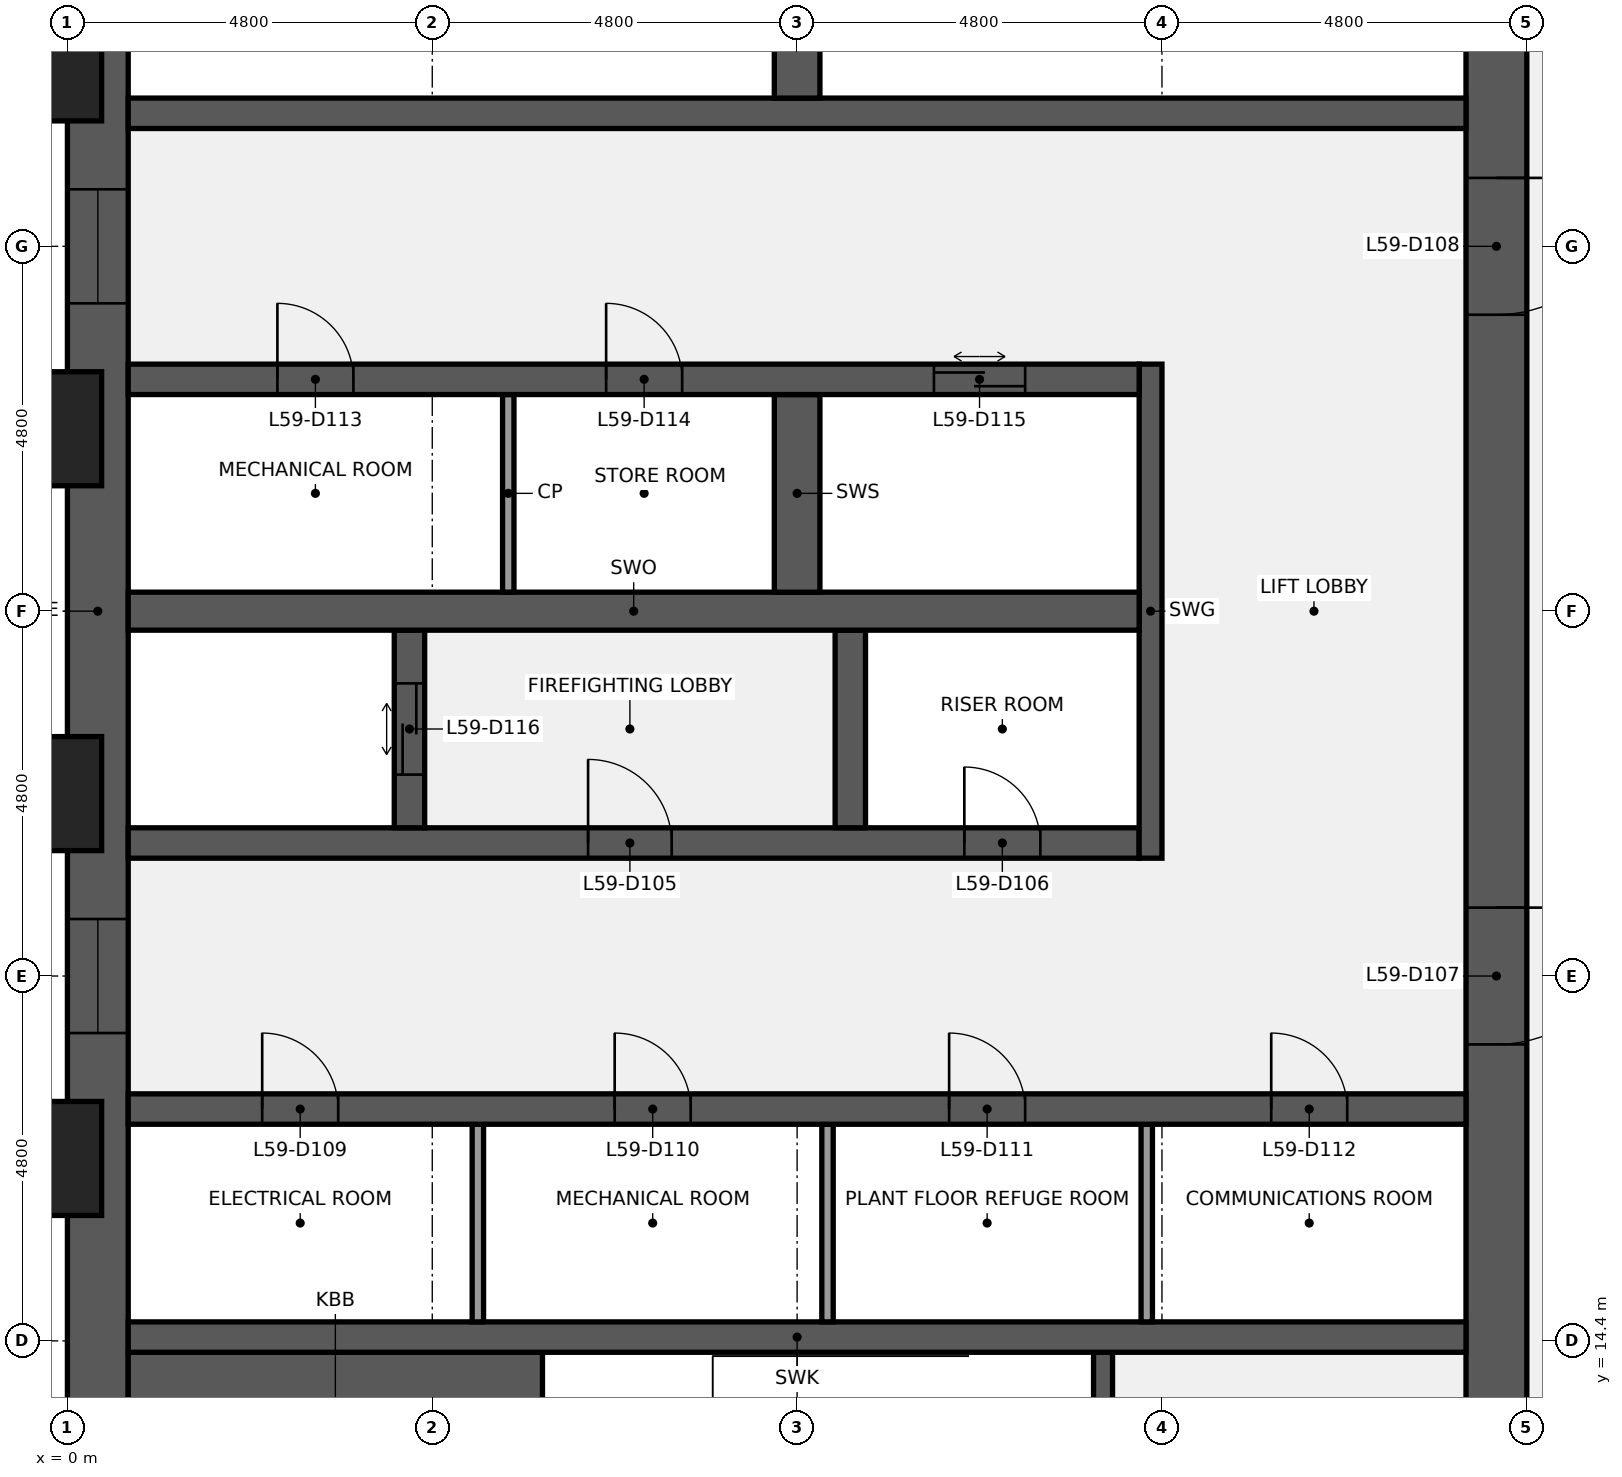
"""IFC4 building model, lengths in metres.
Left out: names, types, materials, properties, quantities, classifications, styles, units other than length and angle.
Written with IfcOpenShell. Run it as: python <this file> out.ifc"""

import sys

from ifc_helpers import new_model, si_unit, direction, frame, frame_2d, origin, origin_2d, place, context, subcontext, project, spatial, rectangle, extrude, element, fill, save


model = new_model("IFC4")
c1 = context("Model", 3, precision=1e-05, world=origin(), true_north=direction((0.0, 1.0)))
c2 = subcontext(c1, "Body", "Model", "MODEL_VIEW")
j1 = project(units=[si_unit("LENGTHUNIT", "METRE"), si_unit("PLANEANGLEUNIT", "RADIAN")], contexts=[c1])
p1 = place(None, origin())
s1 = spatial("IfcSite", under=j1, at=p1, CompositionType="ELEMENT")
p2 = place(p1, origin())
s2 = spatial("IfcBuilding", under=s1, at=p2, CompositionType="ELEMENT")
p3 = place(p2, frame((0.0, 0.0, 265.2)))
s3 = spatial("IfcBuildingStorey", under=s2, at=p3, CompositionType="ELEMENT", Elevation=265.2)
p4 = place(p3, frame((0.4, 9.6, 0.0), z_axis=(0.0, 0.0, 1.0), x_axis=(0.0, 1.0, 0.0)))
e1 = element("IfcWall", 1, at=p4, inside=s3, PredefinedType="SHEAR", context=c2, shape_type="SweptSolid", body=[
    extrude(rectangle(XDim=28.8, YDim=0.8, at=frame_2d((14.4, 0.0))), origin(), (0.0, 0.0, 1.0), 4.1),
])
p5 = place(p4, frame((8.85, 0.0, 0.9)))
e2 = element("IfcOpeningElement", 2, at=p5, cuts=e1, PredefinedType="OPENING", context=c2, shape_type="SweptSolid", body=[
    extrude(rectangle(XDim=1.5, YDim=1.5, at=frame_2d((0.75, 0.75))), frame((0.0, 0.41, 0.0), z_axis=(0.0, -1.0, 0.0), x_axis=(1.0, 0.0, 0.0)), (0.0, 0.0, 1.0), 0.82),
])
p6 = place(p4, frame((18.45, 0.0, 0.9)))
e3 = element("IfcOpeningElement", 3, at=p6, cuts=e1, PredefinedType="OPENING", context=c2, shape_type="SweptSolid", body=[
    extrude(rectangle(XDim=1.5, YDim=1.5, at=frame_2d((0.75, 0.75))), frame((0.0, 0.41, 0.0), z_axis=(0.0, -1.0, 0.0), x_axis=(1.0, 0.0, 0.0)), (0.0, 0.0, 1.0), 0.82),
])
p7 = place(p3, frame((18.8, 38.4, 0.0), z_axis=(0.0, 0.0, 1.0), x_axis=(0.0, -1.0, 0.0)))
e4 = element("IfcWall", 4, at=p7, inside=s3, PredefinedType="SHEAR", context=c2, shape_type="SweptSolid", body=[
    extrude(rectangle(XDim=28.8, YDim=0.8, at=frame_2d((14.4, 0.0))), origin(), (0.0, 0.0, 1.0), 4.1),
])
p8 = place(p7, frame((18.3, 0.0, 0.0)))
e5 = element("IfcOpeningElement", 5, at=p8, cuts=e4, PredefinedType="OPENING", context=c2, shape_type="SweptSolid", body=[
    extrude(rectangle(XDim=1.8, YDim=2.1, at=frame_2d((0.9, 1.05))), frame((0.0, 0.41, 0.0), z_axis=(0.0, -1.0, 0.0), x_axis=(1.0, 0.0, 0.0)), (0.0, 0.0, 1.0), 0.82),
])
p9 = place(p7, frame((8.7, 0.0, 0.0)))
e6 = element("IfcOpeningElement", 6, at=p9, cuts=e4, PredefinedType="OPENING", context=c2, shape_type="SweptSolid", body=[
    extrude(rectangle(XDim=1.8, YDim=2.1, at=frame_2d((0.9, 1.05))), frame((0.0, 0.41, 0.0), z_axis=(0.0, -1.0, 0.0), x_axis=(1.0, 0.0, 0.0)), (0.0, 0.0, 1.0), 0.82),
])
p10 = place(p3, frame((0.8, 12.325, 0.0), z_axis=(0.0, 0.0, 1.0), x_axis=(1.0, 0.0, 0.0)))
e7 = element("IfcWall", 7, at=p10, inside=s3, PredefinedType="SHEAR", context=c2, shape_type="SweptSolid", body=[
    extrude(rectangle(XDim=5.45, YDim=3.85, at=frame_2d((2.725, 0.0))), origin(), (0.0, 0.0, 1.0), 4.1),
])
p11 = place(p3, frame((13.625, 10.8, 0.0), z_axis=(0.0, 0.0, 1.0), x_axis=(0.0, 1.0, 0.0)))
e8 = element("IfcWall", 8, at=p11, inside=s3, PredefinedType="SHEAR", context=c2, shape_type="SweptSolid", body=[
    extrude(rectangle(XDim=3.45, YDim=0.25, at=frame_2d((1.725, 0.0))), origin(), (0.0, 0.0, 1.0), 4.1),
])
p12 = place(p11, frame((1.175, 0.0, 0.0)))
e9 = element("IfcOpeningElement", 9, at=p12, cuts=e8, PredefinedType="OPENING", context=c2, shape_type="SweptSolid", body=[
    extrude(rectangle(XDim=1.1, YDim=2.1, at=frame_2d((0.55, 1.05))), frame((0.0, 0.135, 0.0), z_axis=(0.0, -1.0, 0.0), x_axis=(1.0, 0.0, 0.0)), (0.0, 0.0, 1.0), 0.27),
])
p13 = place(p3, frame((0.8, 14.45, 0.0), z_axis=(0.0, 0.0, 1.0), x_axis=(1.0, 0.0, 0.0)))
e10 = element("IfcWall", 10, at=p13, inside=s3, PredefinedType="SHEAR", context=c2, shape_type="SweptSolid", body=[
    extrude(rectangle(XDim=17.6, YDim=0.4, at=frame_2d((8.8, 0.0))), origin(), (0.0, 0.0, 1.0), 4.1),
])
for number, where, z_axis, x_axis in (
    (11, (5.4, 14.65, 0.0), (0.0, 0.0, 1.0), (0.0, 1.0, 0.0)),
    (12, (10.0, 14.65, 0.0), (0.0, 0.0, 1.0), (0.0, 1.0, 0.0)),
    (13, (14.2, 14.65, 0.0), (0.0, 0.0, 1.0), (0.0, 1.0, 0.0)),
):
    element("IfcWall", number, at=place(p3, frame(where, z_axis=z_axis, x_axis=x_axis)), inside=s3, PredefinedType="PARTITIONING", context=c2, shape_type="SweptSolid", body=[
        extrude(rectangle(XDim=2.6, YDim=0.15, at=frame_2d((1.3, 0.0))), origin(), (0.0, 0.0, 1.0), 4.1),
    ])
p14 = place(p3, frame((0.8, 17.45, 0.0), z_axis=(0.0, 0.0, 1.0), x_axis=(1.0, 0.0, 0.0)))
e14 = element("IfcWall", 14, at=p14, inside=s3, PredefinedType="SHEAR", context=c2, shape_type="SweptSolid", body=[
    extrude(rectangle(XDim=17.6, YDim=0.4, at=frame_2d((8.8, 0.0))), origin(), (0.0, 0.0, 1.0), 4.1),
])
p15 = place(p14, frame((1.762, 0.0, 0.0)))
e15 = element("IfcOpeningElement", 15, at=p15, cuts=e14, PredefinedType="OPENING", context=c2, shape_type="SweptSolid", body=[
    extrude(rectangle(XDim=1.0, YDim=2.1, at=frame_2d((0.5, 1.05))), frame((0.0, 0.21, 0.0), z_axis=(0.0, -1.0, 0.0), x_axis=(1.0, 0.0, 0.0)), (0.0, 0.0, 1.0), 0.42),
])
p16 = place(p14, frame((6.4, 0.0, 0.0)))
e16 = element("IfcOpeningElement", 16, at=p16, cuts=e14, PredefinedType="OPENING", context=c2, shape_type="SweptSolid", body=[
    extrude(rectangle(XDim=1.0, YDim=2.1, at=frame_2d((0.5, 1.05))), frame((0.0, 0.21, 0.0), z_axis=(0.0, -1.0, 0.0), x_axis=(1.0, 0.0, 0.0)), (0.0, 0.0, 1.0), 0.42),
])
p17 = place(p14, frame((10.8, 0.0, 0.0)))
e17 = element("IfcOpeningElement", 17, at=p17, cuts=e14, PredefinedType="OPENING", context=c2, shape_type="SweptSolid", body=[
    extrude(rectangle(XDim=1.0, YDim=2.1, at=frame_2d((0.5, 1.05))), frame((0.0, 0.21, 0.0), z_axis=(0.0, -1.0, 0.0), x_axis=(1.0, 0.0, 0.0)), (0.0, 0.0, 1.0), 0.42),
])
p18 = place(p14, frame((15.038, 0.0, 0.0)))
e18 = element("IfcOpeningElement", 18, at=p18, cuts=e14, PredefinedType="OPENING", context=c2, shape_type="SweptSolid", body=[
    extrude(rectangle(XDim=1.0, YDim=2.1, at=frame_2d((0.5, 1.05))), frame((0.0, 0.21, 0.0), z_axis=(0.0, -1.0, 0.0), x_axis=(1.0, 0.0, 0.0)), (0.0, 0.0, 1.0), 0.42),
])
p19 = place(p3, frame((0.8, 20.95, 0.0), z_axis=(0.0, 0.0, 1.0), x_axis=(1.0, 0.0, 0.0)))
e19 = element("IfcWall", 19, at=p19, inside=s3, PredefinedType="SHEAR", context=c2, shape_type="SweptSolid", body=[
    extrude(rectangle(XDim=13.3, YDim=0.4, at=frame_2d((6.65, 0.0))), origin(), (0.0, 0.0, 1.0), 4.1),
])
p20 = place(p19, frame((6.05, 0.0, 0.0)))
e20 = element("IfcOpeningElement", 20, at=p20, cuts=e19, PredefinedType="OPENING", context=c2, shape_type="SweptSolid", body=[
    extrude(rectangle(XDim=1.1, YDim=2.1, at=frame_2d((0.55, 1.05))), frame((0.0, 0.21, 0.0), z_axis=(0.0, -1.0, 0.0), x_axis=(1.0, 0.0, 0.0)), (0.0, 0.0, 1.0), 0.42),
])
p21 = place(p19, frame((11.0, 0.0, 0.0)))
e21 = element("IfcOpeningElement", 21, at=p21, cuts=e19, PredefinedType="OPENING", context=c2, shape_type="SweptSolid", body=[
    extrude(rectangle(XDim=1.0, YDim=2.1, at=frame_2d((0.5, 1.05))), frame((0.0, 0.21, 0.0), z_axis=(0.0, -1.0, 0.0), x_axis=(1.0, 0.0, 0.0)), (0.0, 0.0, 1.0), 0.42),
])
p22 = place(p3, frame((14.25, 20.75, 0.0), z_axis=(0.0, 0.0, 1.0), x_axis=(0.0, 1.0, 0.0)))
e22 = element("IfcWall", 22, at=p22, inside=s3, PredefinedType="SHEAR", context=c2, shape_type="SweptSolid", body=[
    extrude(rectangle(XDim=6.5, YDim=0.3, at=frame_2d((3.25, 0.0))), origin(), (0.0, 0.0, 1.0), 4.1),
])
p23 = place(p3, frame((4.5, 21.15, 0.0), z_axis=(0.0, 0.0, 1.0), x_axis=(0.0, 1.0, 0.0)))
e23 = element("IfcWall", 23, at=p23, inside=s3, PredefinedType="SHEAR", context=c2, shape_type="SweptSolid", body=[
    extrude(rectangle(XDim=2.6, YDim=0.4, at=frame_2d((1.3, 0.0))), origin(), (0.0, 0.0, 1.0), 4.1),
])
p24 = place(p23, frame((0.7, 0.0, 0.0)))
e24 = element("IfcOpeningElement", 24, at=p24, cuts=e23, PredefinedType="OPENING", context=c2, shape_type="SweptSolid", body=[
    extrude(rectangle(XDim=1.2, YDim=2.1, at=frame_2d((0.6, 1.05))), frame((0.0, 0.21, 0.0), z_axis=(0.0, -1.0, 0.0), x_axis=(1.0, 0.0, 0.0)), (0.0, 0.0, 1.0), 0.42),
])
p25 = place(p3, frame((10.3, 21.15, 0.0), z_axis=(0.0, 0.0, 1.0), x_axis=(0.0, 1.0, 0.0)))
e25 = element("IfcWall", 25, at=p25, inside=s3, PredefinedType="SHEAR", context=c2, shape_type="SweptSolid", body=[
    extrude(rectangle(XDim=2.6, YDim=0.4, at=frame_2d((1.3, 0.0))), origin(), (0.0, 0.0, 1.0), 4.1),
])
p26 = place(p3, frame((0.8, 24.0, 0.0), z_axis=(0.0, 0.0, 1.0), x_axis=(1.0, 0.0, 0.0)))
e26 = element("IfcWall", 26, at=p26, inside=s3, PredefinedType="SHEAR", context=c2, shape_type="SweptSolid", body=[
    extrude(rectangle(XDim=13.3, YDim=0.5, at=frame_2d((6.65, 0.0))), origin(), (0.0, 0.0, 1.0), 4.1),
])
p27 = place(p3, frame((5.8, 24.25, 0.0), z_axis=(0.0, 0.0, 1.0), x_axis=(0.0, 1.0, 0.0)))
e27 = element("IfcWall", 27, at=p27, inside=s3, PredefinedType="PARTITIONING", context=c2, shape_type="SweptSolid", body=[
    extrude(rectangle(XDim=2.6, YDim=0.15, at=frame_2d((1.3, 0.0))), origin(), (0.0, 0.0, 1.0), 4.1),
])
p28 = place(p3, frame((9.6, 24.25, 0.0), z_axis=(0.0, 0.0, 1.0), x_axis=(0.0, 1.0, 0.0)))
e28 = element("IfcWall", 28, at=p28, inside=s3, PredefinedType="SHEAR", context=c2, shape_type="SweptSolid", body=[
    extrude(rectangle(XDim=2.6, YDim=0.6, at=frame_2d((1.3, 0.0))), origin(), (0.0, 0.0, 1.0), 4.1),
])
p29 = place(p3, frame((0.8, 27.05, 0.0), z_axis=(0.0, 0.0, 1.0), x_axis=(1.0, 0.0, 0.0)))
e29 = element("IfcWall", 29, at=p29, inside=s3, PredefinedType="SHEAR", context=c2, shape_type="SweptSolid", body=[
    extrude(rectangle(XDim=13.3, YDim=0.4, at=frame_2d((6.65, 0.0))), origin(), (0.0, 0.0, 1.0), 4.1),
])
p30 = place(p29, frame((1.962, 0.0, 0.0)))
e30 = element("IfcOpeningElement", 30, at=p30, cuts=e29, PredefinedType="OPENING", context=c2, shape_type="SweptSolid", body=[
    extrude(rectangle(XDim=1.0, YDim=2.1, at=frame_2d((0.5, 1.05))), frame((0.0, 0.21, 0.0), z_axis=(0.0, -1.0, 0.0), x_axis=(1.0, 0.0, 0.0)), (0.0, 0.0, 1.0), 0.42),
])
p31 = place(p29, frame((6.288, 0.0, 0.0)))
e31 = element("IfcOpeningElement", 31, at=p31, cuts=e29, PredefinedType="OPENING", context=c2, shape_type="SweptSolid", body=[
    extrude(rectangle(XDim=1.0, YDim=2.1, at=frame_2d((0.5, 1.05))), frame((0.0, 0.21, 0.0), z_axis=(0.0, -1.0, 0.0), x_axis=(1.0, 0.0, 0.0)), (0.0, 0.0, 1.0), 0.42),
])
p32 = place(p29, frame((10.6, 0.0, 0.0)))
e32 = element("IfcOpeningElement", 32, at=p32, cuts=e29, PredefinedType="OPENING", context=c2, shape_type="SweptSolid", body=[
    extrude(rectangle(XDim=1.2, YDim=2.1, at=frame_2d((0.6, 1.05))), frame((0.0, 0.21, 0.0), z_axis=(0.0, -1.0, 0.0), x_axis=(1.0, 0.0, 0.0)), (0.0, 0.0, 1.0), 0.42),
])
p33 = place(p3, frame((0.8, 30.55, 0.0), z_axis=(0.0, 0.0, 1.0), x_axis=(1.0, 0.0, 0.0)))
e33 = element("IfcWall", 33, at=p33, inside=s3, PredefinedType="SHEAR", context=c2, shape_type="SweptSolid", body=[
    extrude(rectangle(XDim=17.6, YDim=0.4, at=frame_2d((8.8, 0.0))), origin(), (0.0, 0.0, 1.0), 4.1),
])
p34 = place(p3, frame((9.6, 30.75, 0.0), z_axis=(0.0, 0.0, 1.0), x_axis=(0.0, 1.0, 0.0)))
e34 = element("IfcWall", 34, at=p34, inside=s3, PredefinedType="SHEAR", context=c2, shape_type="SweptSolid", body=[
    extrude(rectangle(XDim=2.6, YDim=0.6, at=frame_2d((1.3, 0.0))), origin(), (0.0, 0.0, 1.0), 4.1),
])
for number, where, z_axis, x_axis in (
    (35, (-0.75, 16.8, 0.0), (0.0, 0.0, 1.0), (0.0, 1.0, 0.0)),
    (36, (-0.75, 21.6, 0.0), (0.0, 0.0, 1.0), (0.0, 1.0, 0.0)),
    (37, (-0.75, 26.4, 0.0), (0.0, 0.0, 1.0), (0.0, 1.0, 0.0)),
    (38, (-0.75, 31.2, 0.0), (0.0, 0.0, 1.0), (0.0, 1.0, 0.0)),
):
    element("IfcColumn", number, at=place(p3, frame(where, z_axis=z_axis, x_axis=x_axis)), inside=s3, PredefinedType="PILASTER", context=c2, shape_type="SweptSolid", body=[
        extrude(rectangle(XDim=2.4, YDim=1.5, at=origin_2d()), origin(), (0.0, 0.0, 1.0), 4.5),
    ])
p35 = place(p20, origin())
e39 = element("IfcDoor", 39, at=p35, inside=s3, OperationType="SINGLE_SWING_LEFT", PredefinedType="DOOR", context=c2, shape_type="SweptSolid", body=[
    extrude(rectangle(XDim=1.1, YDim=2.1, at=frame_2d((0.55, 1.05))), frame((0.0, 0.025, 0.0), z_axis=(0.0, -1.0, 0.0), x_axis=(1.0, 0.0, 0.0)), (0.0, 0.0, 1.0), 0.05),
])
fill(e20, e39)
p36 = place(p21, origin())
e40 = element("IfcDoor", 40, at=p36, inside=s3, OperationType="SINGLE_SWING_LEFT", PredefinedType="DOOR", context=c2, shape_type="SweptSolid", body=[
    extrude(rectangle(XDim=1.0, YDim=2.1, at=frame_2d((0.5, 1.05))), frame((0.0, 0.025, 0.0), z_axis=(0.0, -1.0, 0.0), x_axis=(1.0, 0.0, 0.0)), (0.0, 0.0, 1.0), 0.05),
])
fill(e21, e40)
p37 = place(p8, origin())
e41 = element("IfcDoor", 41, at=p37, inside=s3, OperationType="DOUBLE_DOOR_SINGLE_SWING", PredefinedType="DOOR", context=c2, shape_type="SweptSolid", body=[
    extrude(rectangle(XDim=1.8, YDim=2.1, at=frame_2d((0.9, 1.05))), frame((0.0, 0.025, 0.0), z_axis=(0.0, -1.0, 0.0), x_axis=(1.0, 0.0, 0.0)), (0.0, 0.0, 1.0), 0.05),
])
fill(e5, e41)
p38 = place(p9, origin())
e42 = element("IfcDoor", 42, at=p38, inside=s3, OperationType="DOUBLE_DOOR_SINGLE_SWING", PredefinedType="DOOR", context=c2, shape_type="SweptSolid", body=[
    extrude(rectangle(XDim=1.8, YDim=2.1, at=frame_2d((0.9, 1.05))), frame((0.0, 0.025, 0.0), z_axis=(0.0, -1.0, 0.0), x_axis=(1.0, 0.0, 0.0)), (0.0, 0.0, 1.0), 0.05),
])
fill(e6, e42)
p39 = place(p15, origin())
e43 = element("IfcDoor", 43, at=p39, inside=s3, OperationType="SINGLE_SWING_LEFT", PredefinedType="DOOR", context=c2, shape_type="SweptSolid", body=[
    extrude(rectangle(XDim=1.0, YDim=2.1, at=frame_2d((0.5, 1.05))), frame((0.0, 0.025, 0.0), z_axis=(0.0, -1.0, 0.0), x_axis=(1.0, 0.0, 0.0)), (0.0, 0.0, 1.0), 0.05),
])
fill(e15, e43)
p40 = place(p16, origin())
e44 = element("IfcDoor", 44, at=p40, inside=s3, OperationType="SINGLE_SWING_LEFT", PredefinedType="DOOR", context=c2, shape_type="SweptSolid", body=[
    extrude(rectangle(XDim=1.0, YDim=2.1, at=frame_2d((0.5, 1.05))), frame((0.0, 0.025, 0.0), z_axis=(0.0, -1.0, 0.0), x_axis=(1.0, 0.0, 0.0)), (0.0, 0.0, 1.0), 0.05),
])
fill(e16, e44)
p41 = place(p17, origin())
e45 = element("IfcDoor", 45, at=p41, inside=s3, OperationType="SINGLE_SWING_LEFT", PredefinedType="DOOR", context=c2, shape_type="SweptSolid", body=[
    extrude(rectangle(XDim=1.0, YDim=2.1, at=frame_2d((0.5, 1.05))), frame((0.0, 0.025, 0.0), z_axis=(0.0, -1.0, 0.0), x_axis=(1.0, 0.0, 0.0)), (0.0, 0.0, 1.0), 0.05),
])
fill(e17, e45)
p42 = place(p18, origin())
e46 = element("IfcDoor", 46, at=p42, inside=s3, OperationType="SINGLE_SWING_LEFT", PredefinedType="DOOR", context=c2, shape_type="SweptSolid", body=[
    extrude(rectangle(XDim=1.0, YDim=2.1, at=frame_2d((0.5, 1.05))), frame((0.0, 0.025, 0.0), z_axis=(0.0, -1.0, 0.0), x_axis=(1.0, 0.0, 0.0)), (0.0, 0.0, 1.0), 0.05),
])
fill(e18, e46)
p43 = place(p30, origin())
e47 = element("IfcDoor", 47, at=p43, inside=s3, OperationType="SINGLE_SWING_LEFT", PredefinedType="DOOR", context=c2, shape_type="SweptSolid", body=[
    extrude(rectangle(XDim=1.0, YDim=2.1, at=frame_2d((0.5, 1.05))), frame((0.0, 0.025, 0.0), z_axis=(0.0, -1.0, 0.0), x_axis=(1.0, 0.0, 0.0)), (0.0, 0.0, 1.0), 0.05),
])
fill(e30, e47)
p44 = place(p31, origin())
e48 = element("IfcDoor", 48, at=p44, inside=s3, OperationType="SINGLE_SWING_LEFT", PredefinedType="DOOR", context=c2, shape_type="SweptSolid", body=[
    extrude(rectangle(XDim=1.0, YDim=2.1, at=frame_2d((0.5, 1.05))), frame((0.0, 0.025, 0.0), z_axis=(0.0, -1.0, 0.0), x_axis=(1.0, 0.0, 0.0)), (0.0, 0.0, 1.0), 0.05),
])
fill(e31, e48)
p45 = place(p32, origin())
e49 = element("IfcDoor", 49, at=p45, inside=s3, OperationType="DOUBLE_DOOR_SLIDING", PredefinedType="DOOR", context=c2, shape_type="SweptSolid", body=[
    extrude(rectangle(XDim=1.2, YDim=2.1, at=frame_2d((0.6, 1.05))), frame((0.0, 0.025, 0.0), z_axis=(0.0, -1.0, 0.0), x_axis=(1.0, 0.0, 0.0)), (0.0, 0.0, 1.0), 0.05),
])
fill(e32, e49)
p46 = place(p24, origin())
e50 = element("IfcDoor", 50, at=p46, inside=s3, OperationType="DOUBLE_DOOR_SLIDING", PredefinedType="DOOR", context=c2, shape_type="SweptSolid", body=[
    extrude(rectangle(XDim=1.2, YDim=2.1, at=frame_2d((0.6, 1.05))), frame((0.0, 0.025, 0.0), z_axis=(0.0, -1.0, 0.0), x_axis=(1.0, 0.0, 0.0)), (0.0, 0.0, 1.0), 0.05),
])
fill(e24, e50)
p47 = place(p5, origin())
e51 = element("IfcWindow", 51, at=p47, inside=s3, PartitioningType="SINGLE_PANEL", PredefinedType="WINDOW", context=c2, shape_type="SweptSolid", body=[
    extrude(rectangle(XDim=1.5, YDim=1.5, at=frame_2d((0.75, 0.75))), frame((0.0, 0.03, 0.0), z_axis=(0.0, -1.0, 0.0), x_axis=(1.0, 0.0, 0.0)), (0.0, 0.0, 1.0), 0.06),
])
fill(e2, e51)
p48 = place(p6, origin())
e52 = element("IfcWindow", 52, at=p48, inside=s3, PartitioningType="SINGLE_PANEL", PredefinedType="WINDOW", context=c2, shape_type="SweptSolid", body=[
    extrude(rectangle(XDim=1.5, YDim=1.5, at=frame_2d((0.75, 0.75))), frame((0.0, 0.03, 0.0), z_axis=(0.0, -1.0, 0.0), x_axis=(1.0, 0.0, 0.0)), (0.0, 0.0, 1.0), 0.06),
])
fill(e3, e52)
save(model, sys.argv[1])
